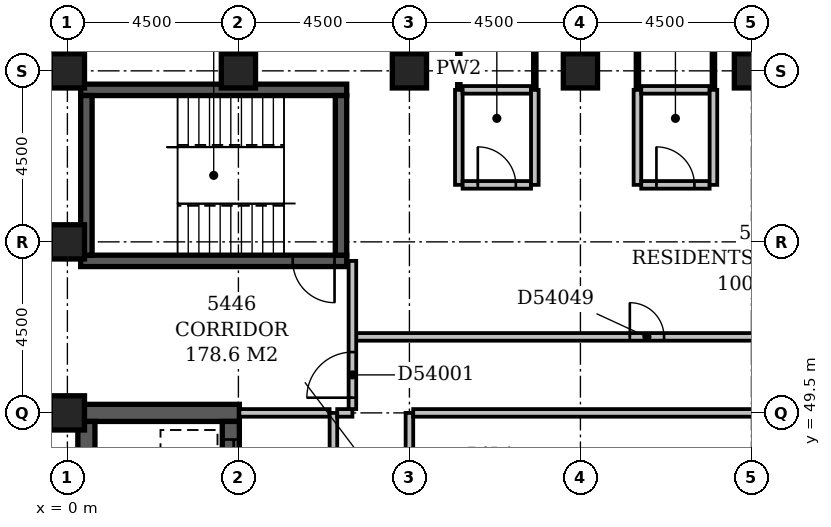
"""IFC4 building model, lengths in metres.
Left out: names, types, materials, properties, quantities, classifications, styles, units other than length and angle.
Written with IfcOpenShell. Run it as: python <this file> out.ifc"""

import sys

from ifc_helpers import new_model, si_unit, direction, frame, frame_2d, origin, origin_2d, place, context, subcontext, project, spatial, rectangle, extrude, element, fill, save


model = new_model("IFC4")
c1 = context("Model", 3, precision=1e-05, world=origin(), true_north=direction((0.0, 1.0)))
c2 = subcontext(c1, "Body", "Model", "MODEL_VIEW")
j1 = project(units=[si_unit("LENGTHUNIT", "METRE"), si_unit("PLANEANGLEUNIT", "RADIAN")], contexts=[c1])
p1 = place(None, origin())
s1 = spatial("IfcSite", under=j1, at=p1, CompositionType="ELEMENT")
p2 = place(p1, origin())
s2 = spatial("IfcBuilding", under=s1, at=p2, CompositionType="ELEMENT")
p3 = place(p2, frame((0.0, 0.0, 211.4)))
s3 = spatial("IfcBuildingStorey", under=s2, at=p3, CompositionType="ELEMENT", Elevation=211.4)
p4 = place(p3, frame((0.275, 49.5, -0.35), z_axis=(0.0, 0.0, 1.0), x_axis=(1.0, 0.0, 0.0)))
e1 = element("IfcWall", 1, at=p4, inside=s3, PredefinedType="SHEAR", context=c2, shape_type="SweptSolid", body=[
    extrude(rectangle(XDim=4.25, YDim=0.45, at=frame_2d((2.125, 0.0))), origin(), (0.0, 0.0, 1.0), 3.65),
])
p5 = place(p3, frame((0.35, 53.5, -0.35), z_axis=(0.0, 0.0, 1.0), x_axis=(1.0, 0.0, 0.0)))
e2 = element("IfcWall", 2, at=p5, inside=s3, PredefinedType="SHEAR", context=c2, shape_type="SweptSolid", body=[
    extrude(rectangle(XDim=7.0, YDim=0.3, at=frame_2d((3.5, 0.0))), origin(), (0.0, 0.0, 1.0), 3.65),
])
p6 = place(p5, frame((5.58, 0.0, 0.35)))
e3 = element("IfcOpeningElement", 3, at=p6, cuts=e2, PredefinedType="OPENING", context=c2, shape_type="SweptSolid", body=[
    extrude(rectangle(XDim=1.1, YDim=2.1, at=frame_2d((0.55, 1.05))), frame((0.0, 0.162, 0.0), z_axis=(0.0, -1.0, 0.0), x_axis=(1.0, 0.0, 0.0)), (0.0, 0.0, 1.0), 0.324),
])
p7 = place(p3, frame((0.35, 58.0, -0.35), z_axis=(0.0, 0.0, 1.0), x_axis=(1.0, 0.0, 0.0)))
e4 = element("IfcWall", 4, at=p7, inside=s3, PredefinedType="SHEAR", context=c2, shape_type="SweptSolid", body=[
    extrude(rectangle(XDim=7.0, YDim=0.3, at=frame_2d((3.5, 0.0))), origin(), (0.0, 0.0, 1.0), 3.65),
])
p8 = place(p3, frame((0.5, 27.15, -0.35), z_axis=(0.0, 0.0, 1.0), x_axis=(0.0, 1.0, 0.0)))
e5 = element("IfcWall", 5, at=p8, inside=s3, PredefinedType="SHEAR", context=c2, shape_type="SweptSolid", body=[
    extrude(rectangle(XDim=22.125, YDim=0.45, at=frame_2d((11.062, 0.0))), origin(), (0.0, 0.0, 1.0), 3.65),
])
p9 = place(p3, frame((0.5, 53.65, -0.35), z_axis=(0.0, 0.0, 1.0), x_axis=(0.0, 1.0, 0.0)))
e6 = element("IfcWall", 6, at=p9, inside=s3, PredefinedType="SHEAR", context=c2, shape_type="SweptSolid", body=[
    extrude(rectangle(XDim=4.2, YDim=0.3, at=frame_2d((2.1, 0.0))), origin(), (0.0, 0.0, 1.0), 3.65),
])
p10 = place(p3, frame((4.3, 27.15, -0.35), z_axis=(0.0, 0.0, 1.0), x_axis=(0.0, 1.0, 0.0)))
e7 = element("IfcWall", 7, at=p10, inside=s3, PredefinedType="SHEAR", context=c2, shape_type="SweptSolid", body=[
    extrude(rectangle(XDim=22.125, YDim=0.45, at=frame_2d((11.062, 0.0))), origin(), (0.0, 0.0, 1.0), 3.65),
])
p11 = place(p10, frame((3.05, 0.0, 0.35)))
e8 = element("IfcOpeningElement", 8, at=p11, cuts=e7, PredefinedType="OPENING", context=c2, shape_type="SweptSolid", body=[
    extrude(rectangle(XDim=1.1, YDim=2.1, at=frame_2d((0.55, 1.05))), frame((0.0, 0.237, 0.0), z_axis=(0.0, -1.0, 0.0), x_axis=(1.0, 0.0, 0.0)), (0.0, 0.0, 1.0), 0.474),
])
p12 = place(p10, frame((0.55, 0.0, 0.35)))
e9 = element("IfcOpeningElement", 9, at=p12, cuts=e7, PredefinedType="OPENING", context=c2, shape_type="SweptSolid", body=[
    extrude(rectangle(XDim=1.1, YDim=2.1, at=frame_2d((0.55, 1.05))), frame((0.0, 0.237, 0.0), z_axis=(0.0, -1.0, 0.0), x_axis=(1.0, 0.0, 0.0)), (0.0, 0.0, 1.0), 0.474),
])
p13 = place(p10, frame((20.55, 0.0, 0.35)))
e10 = element("IfcOpeningElement", 10, at=p13, cuts=e7, PredefinedType="OPENING", context=c2, shape_type="SweptSolid", body=[
    extrude(rectangle(XDim=1.1, YDim=2.1, at=frame_2d((0.55, 1.05))), frame((0.0, 0.237, 0.0), z_axis=(0.0, -1.0, 0.0), x_axis=(1.0, 0.0, 0.0)), (0.0, 0.0, 1.0), 0.474),
])
p14 = place(p10, frame((18.05, 0.0, 0.35)))
e11 = element("IfcOpeningElement", 11, at=p14, cuts=e7, PredefinedType="OPENING", context=c2, shape_type="SweptSolid", body=[
    extrude(rectangle(XDim=1.1, YDim=2.1, at=frame_2d((0.55, 1.05))), frame((0.0, 0.237, 0.0), z_axis=(0.0, -1.0, 0.0), x_axis=(1.0, 0.0, 0.0)), (0.0, 0.0, 1.0), 0.474),
])
p15 = place(p10, frame((15.55, 0.0, 0.35)))
e12 = element("IfcOpeningElement", 12, at=p15, cuts=e7, PredefinedType="OPENING", context=c2, shape_type="SweptSolid", body=[
    extrude(rectangle(XDim=1.1, YDim=2.1, at=frame_2d((0.55, 1.05))), frame((0.0, 0.237, 0.0), z_axis=(0.0, -1.0, 0.0), x_axis=(1.0, 0.0, 0.0)), (0.0, 0.0, 1.0), 0.474),
])
p16 = place(p10, frame((13.05, 0.0, 0.35)))
e13 = element("IfcOpeningElement", 13, at=p16, cuts=e7, PredefinedType="OPENING", context=c2, shape_type="SweptSolid", body=[
    extrude(rectangle(XDim=1.1, YDim=2.1, at=frame_2d((0.55, 1.05))), frame((0.0, 0.237, 0.0), z_axis=(0.0, -1.0, 0.0), x_axis=(1.0, 0.0, 0.0)), (0.0, 0.0, 1.0), 0.474),
])
p17 = place(p10, frame((10.55, 0.0, 0.35)))
e14 = element("IfcOpeningElement", 14, at=p17, cuts=e7, PredefinedType="OPENING", context=c2, shape_type="SweptSolid", body=[
    extrude(rectangle(XDim=1.1, YDim=2.1, at=frame_2d((0.55, 1.05))), frame((0.0, 0.237, 0.0), z_axis=(0.0, -1.0, 0.0), x_axis=(1.0, 0.0, 0.0)), (0.0, 0.0, 1.0), 0.474),
])
p18 = place(p10, frame((8.05, 0.0, 0.35)))
e15 = element("IfcOpeningElement", 15, at=p18, cuts=e7, PredefinedType="OPENING", context=c2, shape_type="SweptSolid", body=[
    extrude(rectangle(XDim=1.1, YDim=2.1, at=frame_2d((0.55, 1.05))), frame((0.0, 0.237, 0.0), z_axis=(0.0, -1.0, 0.0), x_axis=(1.0, 0.0, 0.0)), (0.0, 0.0, 1.0), 0.474),
])
p19 = place(p10, frame((5.55, 0.0, 0.35)))
e16 = element("IfcOpeningElement", 16, at=p19, cuts=e7, PredefinedType="OPENING", context=c2, shape_type="SweptSolid", body=[
    extrude(rectangle(XDim=1.1, YDim=2.1, at=frame_2d((0.55, 1.05))), frame((0.0, 0.237, 0.0), z_axis=(0.0, -1.0, 0.0), x_axis=(1.0, 0.0, 0.0)), (0.0, 0.0, 1.0), 0.474),
])
p20 = place(p3, frame((7.2, 53.65, -0.35), z_axis=(0.0, 0.0, 1.0), x_axis=(0.0, 1.0, 0.0)))
e17 = element("IfcWall", 17, at=p20, inside=s3, PredefinedType="SHEAR", context=c2, shape_type="SweptSolid", body=[
    extrude(rectangle(XDim=4.2, YDim=0.3, at=frame_2d((2.1, 0.0))), origin(), (0.0, 0.0, 1.0), 3.65),
])
for number, where, z_axis, x_axis in (
    (18, (0.0, 49.5, -0.35), (0.0, 0.0, 1.0), (1.0, 0.0, 0.0)),
    (19, (0.0, 54.0, -0.35), (0.0, 0.0, 1.0), (1.0, 0.0, 0.0)),
    (20, (0.0, 58.5, -0.35), (0.0, 0.0, 1.0), (1.0, 0.0, 0.0)),
    (21, (4.5, 58.5, -0.35), (0.0, 0.0, 1.0), (1.0, 0.0, 0.0)),
    (22, (9.0, 58.5, -0.35), (0.0, 0.0, 1.0), (1.0, 0.0, 0.0)),
    (23, (13.5, 58.5, -0.35), (0.0, 0.0, 1.0), (1.0, 0.0, 0.0)),
    (24, (18.0, 58.5, -0.35), (0.0, 0.0, 1.0), (1.0, 0.0, 0.0)),
):
    element("IfcColumn", number, at=place(p3, frame(where, z_axis=z_axis, x_axis=x_axis)), inside=s3, PredefinedType="COLUMN", context=c2, shape_type="SweptSolid", body=[
        extrude(rectangle(XDim=0.9, YDim=0.9, at=origin_2d()), origin(), (0.0, 0.0, 1.0), 3.65),
    ])
p21 = place(p3, frame((7.0, 34.6, 0.0), z_axis=(0.0, 0.0, 1.0), x_axis=(0.0, 1.0, 0.0)))
e25 = element("IfcWall", 25, at=p21, inside=s3, PredefinedType="PARTITIONING", context=c2, shape_type="SweptSolid", body=[
    extrude(rectangle(XDim=14.9, YDim=0.2, at=frame_2d((7.45, 0.0))), origin(), (0.0, 0.0, 1.0), 3.3),
])
p22 = place(p21, frame((2.8, 0.0, 0.0)))
e26 = element("IfcOpeningElement", 26, at=p22, cuts=e25, PredefinedType="OPENING", context=c2, shape_type="SweptSolid", body=[
    extrude(rectangle(XDim=1.2, YDim=2.1, at=frame_2d((0.6, 1.05))), frame((0.0, 0.112, 0.0), z_axis=(0.0, -1.0, 0.0), x_axis=(1.0, 0.0, 0.0)), (0.0, 0.0, 1.0), 0.224),
])
p23 = place(p21, frame((9.8, 0.0, 0.0)))
e27 = element("IfcOpeningElement", 27, at=p23, cuts=e25, PredefinedType="OPENING", context=c2, shape_type="SweptSolid", body=[
    extrude(rectangle(XDim=1.2, YDim=2.1, at=frame_2d((0.6, 1.05))), frame((0.0, 0.112, 0.0), z_axis=(0.0, -1.0, 0.0), x_axis=(1.0, 0.0, 0.0)), (0.0, 0.0, 1.0), 0.224),
])
p24 = place(p3, frame((4.525, 49.5, 0.0), z_axis=(0.0, 0.0, 1.0), x_axis=(1.0, 0.0, 0.0)))
e28 = element("IfcWall", 28, at=p24, inside=s3, PredefinedType="PARTITIONING", context=c2, shape_type="SweptSolid", body=[
    extrude(rectangle(XDim=2.375, YDim=0.2, at=frame_2d((1.188, 0.0))), origin(), (0.0, 0.0, 1.0), 3.3),
])
p25 = place(p3, frame((7.1, 49.5, 0.0), z_axis=(0.0, 0.0, 1.0), x_axis=(1.0, 0.0, 0.0)))
e29 = element("IfcWall", 29, at=p25, inside=s3, PredefinedType="PARTITIONING", context=c2, shape_type="SweptSolid", body=[
    extrude(rectangle(XDim=0.4, YDim=0.2, at=frame_2d((0.2, 0.0))), origin(), (0.0, 0.0, 1.0), 3.3),
])
p26 = place(p3, frame((7.5, 49.6, 0.0), z_axis=(0.0, 0.0, 1.0), x_axis=(0.0, 1.0, 0.0)))
e30 = element("IfcWall", 30, at=p26, inside=s3, PredefinedType="PARTITIONING", context=c2, shape_type="SweptSolid", body=[
    extrude(rectangle(XDim=3.9, YDim=0.2, at=frame_2d((1.95, 0.0))), origin(), (0.0, 0.0, 1.0), 3.3),
])
p27 = place(p26, frame((0.3, 0.0, 0.0)))
e31 = element("IfcOpeningElement", 31, at=p27, cuts=e30, PredefinedType="OPENING", context=c2, shape_type="SweptSolid", body=[
    extrude(rectangle(XDim=1.2, YDim=2.1, at=frame_2d((0.6, 1.05))), frame((0.0, 0.112, 0.0), z_axis=(0.0, -1.0, 0.0), x_axis=(1.0, 0.0, 0.0)), (0.0, 0.0, 1.0), 0.224),
])
p28 = place(p3, frame((9.0, 38.0, 0.0), z_axis=(0.0, 0.0, 1.0), x_axis=(0.0, 1.0, 0.0)))
e32 = element("IfcWall", 32, at=p28, inside=s3, PredefinedType="PARTITIONING", context=c2, shape_type="SweptSolid", body=[
    extrude(rectangle(XDim=11.5, YDim=0.2, at=frame_2d((5.75, 0.0))), origin(), (0.0, 0.0, 1.0), 3.3),
])
p29 = place(p28, frame((5.25, 0.0, 0.0)))
e33 = element("IfcOpeningElement", 33, at=p29, cuts=e32, PredefinedType="OPENING", context=c2, shape_type="SweptSolid", body=[
    extrude(rectangle(XDim=0.9, YDim=2.1, at=frame_2d((0.45, 1.05))), frame((0.0, 0.112, 0.0), z_axis=(0.0, -1.0, 0.0), x_axis=(1.0, 0.0, 0.0)), (0.0, 0.0, 1.0), 0.224),
])
p30 = place(p3, frame((9.1, 49.5, 0.0), z_axis=(0.0, 0.0, 1.0), x_axis=(1.0, 0.0, 0.0)))
e34 = element("IfcWall", 34, at=p30, inside=s3, PredefinedType="PARTITIONING", context=c2, shape_type="SweptSolid", body=[
    extrude(rectangle(XDim=11.3, YDim=0.2, at=frame_2d((5.65, 0.0))), origin(), (0.0, 0.0, 1.0), 3.3),
])
p31 = place(p3, frame((7.6, 51.5, 0.0), z_axis=(0.0, 0.0, 1.0), x_axis=(1.0, 0.0, 0.0)))
e35 = element("IfcWall", 35, at=p31, inside=s3, PredefinedType="PARTITIONING", context=c2, shape_type="SweptSolid", body=[
    extrude(rectangle(XDim=15.3, YDim=0.2, at=frame_2d((7.65, 0.0))), origin(), (0.0, 0.0, 1.0), 3.3),
])
p32 = place(p31, frame((7.2, 0.0, 0.0)))
e36 = element("IfcOpeningElement", 36, at=p32, cuts=e35, PredefinedType="OPENING", context=c2, shape_type="SweptSolid", body=[
    extrude(rectangle(XDim=0.9, YDim=2.1, at=frame_2d((0.45, 1.05))), frame((0.0, 0.112, 0.0), z_axis=(0.0, -1.0, 0.0), x_axis=(1.0, 0.0, 0.0)), (0.0, 0.0, 1.0), 0.224),
])
p33 = place(p3, frame((10.3, 55.5, 0.0), z_axis=(0.0, 0.0, 1.0), x_axis=(0.0, 1.0, 0.0)))
e37 = element("IfcWall", 37, at=p33, inside=s3, PredefinedType="PARTITIONING", context=c2, shape_type="SweptSolid", body=[
    extrude(rectangle(XDim=2.5, YDim=0.2, at=frame_2d((1.25, 0.0))), origin(), (0.0, 0.0, 1.0), 3.3),
])
p34 = place(p3, frame((10.4, 55.5, 0.0), z_axis=(0.0, 0.0, 1.0), x_axis=(1.0, 0.0, 0.0)))
e38 = element("IfcWall", 38, at=p34, inside=s3, PredefinedType="PARTITIONING", context=c2, shape_type="SweptSolid", body=[
    extrude(rectangle(XDim=1.8, YDim=0.2, at=frame_2d((0.9, 0.0))), origin(), (0.0, 0.0, 1.0), 3.3),
])
p35 = place(p34, frame((0.4, 0.0, 0.0)))
e39 = element("IfcOpeningElement", 39, at=p35, cuts=e38, PredefinedType="OPENING", context=c2, shape_type="SweptSolid", body=[
    extrude(rectangle(XDim=1.0, YDim=2.1, at=frame_2d((0.5, 1.05))), frame((0.0, 0.112, 0.0), z_axis=(0.0, -1.0, 0.0), x_axis=(1.0, 0.0, 0.0)), (0.0, 0.0, 1.0), 0.224),
])
for number, where, z_axis, x_axis in (
    (40, (12.3, 55.5, 0.0), (0.0, 0.0, 1.0), (0.0, 1.0, 0.0)),
    (41, (15.0, 55.5, 0.0), (0.0, 0.0, 1.0), (0.0, 1.0, 0.0)),
):
    element("IfcWall", number, at=place(p3, frame(where, z_axis=z_axis, x_axis=x_axis)), inside=s3, PredefinedType="PARTITIONING", context=c2, shape_type="SweptSolid", body=[
        extrude(rectangle(XDim=2.5, YDim=0.2, at=frame_2d((1.25, 0.0))), origin(), (0.0, 0.0, 1.0), 3.3),
    ])
p36 = place(p3, frame((15.1, 55.5, 0.0), z_axis=(0.0, 0.0, 1.0), x_axis=(1.0, 0.0, 0.0)))
e42 = element("IfcWall", 42, at=p36, inside=s3, PredefinedType="PARTITIONING", context=c2, shape_type="SweptSolid", body=[
    extrude(rectangle(XDim=1.8, YDim=0.2, at=frame_2d((0.9, 0.0))), origin(), (0.0, 0.0, 1.0), 3.3),
])
p37 = place(p36, frame((0.4, 0.0, 0.0)))
e43 = element("IfcOpeningElement", 43, at=p37, cuts=e42, PredefinedType="OPENING", context=c2, shape_type="SweptSolid", body=[
    extrude(rectangle(XDim=1.0, YDim=2.1, at=frame_2d((0.5, 1.05))), frame((0.0, 0.112, 0.0), z_axis=(0.0, -1.0, 0.0), x_axis=(1.0, 0.0, 0.0)), (0.0, 0.0, 1.0), 0.224),
])
p38 = place(p3, frame((17.0, 55.5, 0.0), z_axis=(0.0, 0.0, 1.0), x_axis=(0.0, 1.0, 0.0)))
e44 = element("IfcWall", 44, at=p38, inside=s3, PredefinedType="PARTITIONING", context=c2, shape_type="SweptSolid", body=[
    extrude(rectangle(XDim=2.5, YDim=0.2, at=frame_2d((1.25, 0.0))), origin(), (0.0, 0.0, 1.0), 3.3),
])
p39 = place(p3, frame((10.3, 58.0, 0.0), z_axis=(0.0, 0.0, 1.0), x_axis=(0.0, 1.0, 0.0)))
e45 = element("IfcWall", 45, at=p39, inside=s3, PredefinedType="PARTITIONING", context=c2, shape_type="SweptSolid", body=[
    extrude(rectangle(XDim=1.1, YDim=0.1, at=frame_2d((0.55, 0.0))), origin(), (0.0, 0.0, 1.0), 3.3),
])
p40 = place(p3, frame((10.4, 58.0, 0.0), z_axis=(0.0, 0.0, 1.0), x_axis=(1.0, 0.0, 0.0)))
e46 = element("IfcWall", 46, at=p40, inside=s3, PredefinedType="PARTITIONING", context=c2, shape_type="SweptSolid", body=[
    extrude(rectangle(XDim=1.8, YDim=0.2, at=frame_2d((0.9, 0.0))), origin(), (0.0, 0.0, 1.0), 3.3),
])
for number, where, z_axis, x_axis in (
    (47, (12.3, 58.0, 0.0), (0.0, 0.0, 1.0), (0.0, 1.0, 0.0)),
    (48, (15.0, 58.0, 0.0), (0.0, 0.0, 1.0), (0.0, 1.0, 0.0)),
):
    element("IfcWall", number, at=place(p3, frame(where, z_axis=z_axis, x_axis=x_axis)), inside=s3, PredefinedType="PARTITIONING", context=c2, shape_type="SweptSolid", body=[
        extrude(rectangle(XDim=1.1, YDim=0.1, at=frame_2d((0.55, 0.0))), origin(), (0.0, 0.0, 1.0), 3.3),
    ])
p41 = place(p3, frame((15.1, 58.0, 0.0), z_axis=(0.0, 0.0, 1.0), x_axis=(1.0, 0.0, 0.0)))
e49 = element("IfcWall", 49, at=p41, inside=s3, PredefinedType="PARTITIONING", context=c2, shape_type="SweptSolid", body=[
    extrude(rectangle(XDim=1.8, YDim=0.2, at=frame_2d((0.9, 0.0))), origin(), (0.0, 0.0, 1.0), 3.3),
])
p42 = place(p3, frame((17.0, 58.0, 0.0), z_axis=(0.0, 0.0, 1.0), x_axis=(0.0, 1.0, 0.0)))
e50 = element("IfcWall", 50, at=p42, inside=s3, PredefinedType="PARTITIONING", context=c2, shape_type="SweptSolid", body=[
    extrude(rectangle(XDim=1.1, YDim=0.1, at=frame_2d((0.55, 0.0))), origin(), (0.0, 0.0, 1.0), 3.3),
])
p43 = place(p27, origin())
e51 = element("IfcDoor", 51, at=p43, inside=s3, OperationType="SINGLE_SWING_LEFT", PredefinedType="DOOR", context=c2, shape_type="SweptSolid", body=[
    extrude(rectangle(XDim=1.2, YDim=2.1, at=frame_2d((0.6, 1.05))), frame((0.0, 0.025, 0.0), z_axis=(0.0, -1.0, 0.0), x_axis=(1.0, 0.0, 0.0)), (0.0, 0.0, 1.0), 0.05),
])
fill(e31, e51)
p44 = place(p13, origin())
e52 = element("IfcDoor", 52, at=p44, inside=s3, OperationType="SLIDING_TO_LEFT", PredefinedType="DOOR", context=c2, shape_type="SweptSolid", body=[
    extrude(rectangle(XDim=1.1, YDim=2.1, at=frame_2d((0.55, 1.05))), frame((0.0, 0.025, 0.0), z_axis=(0.0, -1.0, 0.0), x_axis=(1.0, 0.0, 0.0)), (0.0, 0.0, 1.0), 0.05),
])
fill(e10, e52)
p45 = place(p6, origin())
e53 = element("IfcDoor", 53, at=p45, inside=s3, OperationType="SINGLE_SWING_RIGHT", PredefinedType="DOOR", context=c2, shape_type="SweptSolid", body=[
    extrude(rectangle(XDim=1.1, YDim=2.1, at=frame_2d((0.55, 1.05))), frame((0.0, 0.025, 0.0), z_axis=(0.0, -1.0, 0.0), x_axis=(1.0, 0.0, 0.0)), (0.0, 0.0, 1.0), 0.05),
])
fill(e3, e53)
p46 = place(p32, origin())
e54 = element("IfcDoor", 54, at=p46, inside=s3, OperationType="SINGLE_SWING_LEFT", PredefinedType="DOOR", context=c2, shape_type="SweptSolid", body=[
    extrude(rectangle(XDim=0.9, YDim=2.1, at=frame_2d((0.45, 1.05))), frame((0.0, 0.025, 0.0), z_axis=(0.0, -1.0, 0.0), x_axis=(1.0, 0.0, 0.0)), (0.0, 0.0, 1.0), 0.05),
])
fill(e36, e54)
p47 = place(p35, origin())
e55 = element("IfcDoor", 55, at=p47, inside=s3, OperationType="SINGLE_SWING_LEFT", PredefinedType="DOOR", context=c2, shape_type="SweptSolid", body=[
    extrude(rectangle(XDim=1.0, YDim=2.1, at=frame_2d((0.5, 1.05))), frame((0.0, 0.025, 0.0), z_axis=(0.0, -1.0, 0.0), x_axis=(1.0, 0.0, 0.0)), (0.0, 0.0, 1.0), 0.05),
])
fill(e39, e55)
p48 = place(p37, origin())
e56 = element("IfcDoor", 56, at=p48, inside=s3, OperationType="SINGLE_SWING_LEFT", PredefinedType="DOOR", context=c2, shape_type="SweptSolid", body=[
    extrude(rectangle(XDim=1.0, YDim=2.1, at=frame_2d((0.5, 1.05))), frame((0.0, 0.025, 0.0), z_axis=(0.0, -1.0, 0.0), x_axis=(1.0, 0.0, 0.0)), (0.0, 0.0, 1.0), 0.05),
])
fill(e43, e56)
save(model, sys.argv[1])
